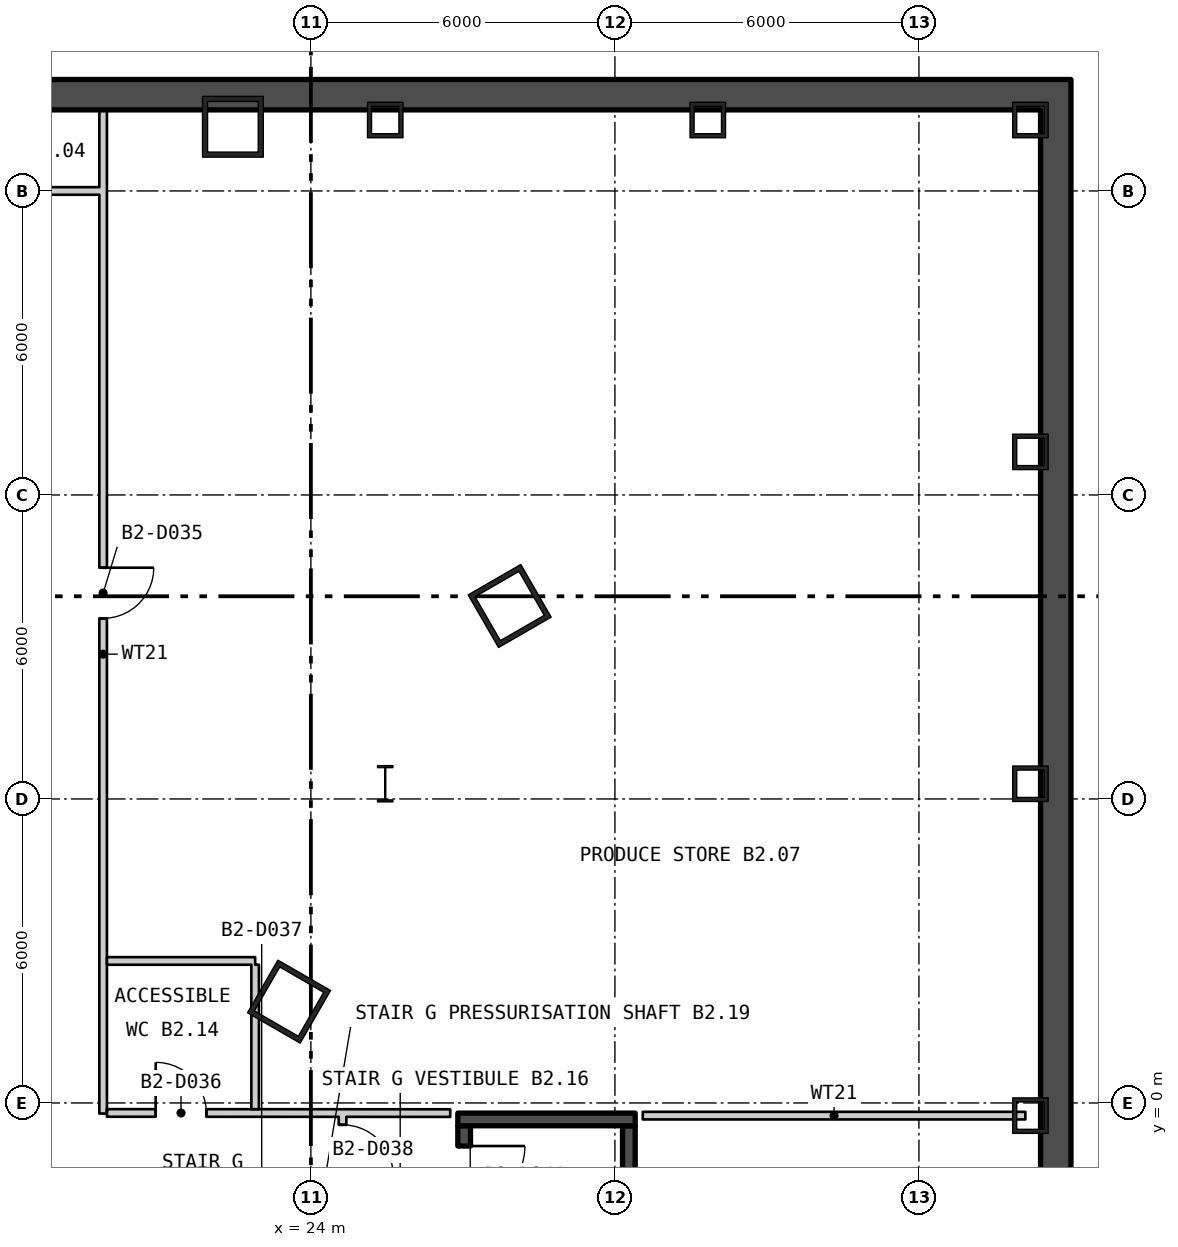
"""IFC4 building model, lengths in metres.
Left out: names, types, materials, properties, quantities, classifications, styles, units other than length and angle.
Written with IfcOpenShell. Run it as: python <this file> out.ifc"""

import sys

from ifc_helpers import new_model, si_unit, direction, frame, frame_2d, origin, origin_2d, place, context, subcontext, project, spatial, rectangle, hollow_rectangle, i_section, extrude, element, fill, save


model = new_model("IFC4")
c1 = context("Model", 3, precision=1e-05, world=origin(), true_north=direction((0.0, 1.0)))
c2 = subcontext(c1, "Body", "Model", "MODEL_VIEW")
j1 = project(units=[si_unit("LENGTHUNIT", "METRE"), si_unit("PLANEANGLEUNIT", "RADIAN")], contexts=[c1])
p1 = place(None, origin())
s1 = spatial("IfcSite", under=j1, at=p1, CompositionType="ELEMENT")
p2 = place(p1, origin())
s2 = spatial("IfcBuilding", under=s1, at=p2, CompositionType="ELEMENT")
p3 = place(p2, frame((0.0, 0.0, -11.4)))
s3 = spatial("IfcBuildingStorey", under=s2, at=p3, CompositionType="ELEMENT", Elevation=-11.4)
for number, where, z_axis, x_axis in (
    (1, (22.461, 19.267, 0.0), (0.0, 0.0, 1.0), (-1.0, 0.0, 0.0)),
    (2, (23.569, 2.0, 0.0), (0.0, 0.0, 1.0), (0.5, 0.866, 0.0)),
    (3, (27.923, 9.808, 0.0), (0.0, 0.0, 1.0), (-0.5, 0.866, 0.0)),
):
    element("IfcColumn", number, at=place(p3, frame(where, z_axis=z_axis, x_axis=x_axis)), inside=s3, PredefinedType="COLUMN", context=c2, shape_type="SweptSolid", body=[
        extrude(hollow_rectangle(XDim=1.2, YDim=1.2, WallThickness=0.1, at=origin_2d()), origin(), (0.0, 0.0, 1.0), 5.7),
    ])
for number, where, z_axis, x_axis in (
    (4, (38.2, -0.25, 0.0), (0.0, 0.0, 1.0), (0.0, 1.0, 0.0)),
    (5, (38.2, 6.3, 0.0), (0.0, 0.0, 1.0), (0.0, 1.0, 0.0)),
    (6, (38.2, 12.85, 0.0), (0.0, 0.0, 1.0), (0.0, 1.0, 0.0)),
    (7, (38.2, 19.4, 0.0), (0.0, 0.0, 1.0), (-1.0, 0.0, 0.0)),
    (8, (31.833, 19.4, 0.0), (0.0, 0.0, 1.0), (-1.0, 0.0, 0.0)),
    (9, (25.467, 19.4, 0.0), (0.0, 0.0, 1.0), (-1.0, 0.0, 0.0)),
):
    element("IfcColumn", number, at=place(p3, frame(where, z_axis=z_axis, x_axis=x_axis)), inside=s3, PredefinedType="COLUMN", context=c2, shape_type="SweptSolid", body=[
        extrude(hollow_rectangle(XDim=0.7, YDim=0.7, WallThickness=0.08, at=origin_2d()), origin(), (0.0, 0.0, 1.0), 5.7),
    ])
p4 = place(p3, frame((25.467, 6.3, 0.0), z_axis=(0.0, 0.0, 1.0), x_axis=(1.0, 0.0, 0.0)))
e10 = element("IfcColumn", 10, at=p4, inside=s3, PredefinedType="COLUMN", context=c2, shape_type="SweptSolid", body=[
    extrude(i_section(OverallWidth=0.304, OverallDepth=0.716, WebThickness=0.021, FlangeThickness=0.04, at=origin_2d()), origin(), (0.0, 0.0, 1.0), 5.7),
])
p5 = place(p3, frame((-39.0, 19.9, -0.4), z_axis=(0.0, 0.0, 1.0), x_axis=(1.0, 0.0, 0.0)))
e11 = element("IfcWall", 11, at=p5, inside=s3, PredefinedType="STANDARD", context=c2, shape_type="SweptSolid", body=[
    extrude(rectangle(XDim=78.0, YDim=0.6, at=frame_2d((39.0, 0.0))), origin(), (0.0, 0.0, 1.0), 5.7),
])
p6 = place(p3, frame((38.7, -33.2, -0.4), z_axis=(0.0, 0.0, 1.0), x_axis=(0.0, 1.0, 0.0)))
e12 = element("IfcWall", 12, at=p6, inside=s3, PredefinedType="STANDARD", context=c2, shape_type="SweptSolid", body=[
    extrude(rectangle(XDim=52.8, YDim=0.6, at=frame_2d((26.4, 0.0))), origin(), (0.0, 0.0, 1.0), 5.7),
])
p7 = place(p3, frame((27.025, -7.75, 0.0), z_axis=(0.0, 0.0, 1.0), x_axis=(0.0, 1.0, 0.0)))
e13 = element("IfcWall", 13, at=p7, inside=s3, PredefinedType="SHEAR", context=c2, shape_type="SweptSolid", body=[
    extrude(rectangle(XDim=7.3, YDim=0.25, at=frame_2d((3.65, 0.0))), origin(), (0.0, 0.0, 1.0), 5.25),
])
p8 = place(p7, frame((5.7, 0.0, 0.0)))
e14 = element("IfcOpeningElement", 14, at=p8, cuts=e13, PredefinedType="OPENING", context=c2, shape_type="SweptSolid", body=[
    extrude(rectangle(XDim=1.2, YDim=2.1, at=frame_2d((0.6, 1.05))), frame((0.0, 0.135, 0.0), z_axis=(0.0, -1.0, 0.0), x_axis=(1.0, 0.0, 0.0)), (0.0, 0.0, 1.0), 0.27),
])
p9 = place(p3, frame((30.275, -7.75, 0.0), z_axis=(0.0, 0.0, 1.0), x_axis=(0.0, 1.0, 0.0)))
e15 = element("IfcWall", 15, at=p9, inside=s3, PredefinedType="SHEAR", context=c2, shape_type="SweptSolid", body=[
    extrude(rectangle(XDim=7.3, YDim=0.25, at=frame_2d((3.65, 0.0))), origin(), (0.0, 0.0, 1.0), 5.25),
])
p10 = place(p3, frame((26.9, -0.325, 0.0), z_axis=(0.0, 0.0, 1.0), x_axis=(1.0, 0.0, 0.0)))
e16 = element("IfcWall", 16, at=p10, inside=s3, PredefinedType="SHEAR", context=c2, shape_type="SweptSolid", body=[
    extrude(rectangle(XDim=3.5, YDim=0.25, at=frame_2d((1.75, 0.0))), origin(), (0.0, 0.0, 1.0), 5.25),
])
p11 = place(p3, frame((17.5, 18.0, 0.0), z_axis=(0.0, 0.0, 1.0), x_axis=(1.0, 0.0, 0.0)))
e17 = element("IfcWall", 17, at=p11, inside=s3, PredefinedType="PARTITIONING", context=c2, shape_type="SweptSolid", body=[
    extrude(rectangle(XDim=2.475, YDim=0.15, at=frame_2d((1.238, 0.0))), origin(), (0.0, 0.0, 1.0), 5.25),
])
p12 = place(p3, frame((19.9, -0.209, 0.0), z_axis=(0.0, 0.0, 1.0), x_axis=(0.0, 1.0, 0.0)))
e18 = element("IfcWall", 18, at=p12, inside=s3, PredefinedType="PARTITIONING", context=c2, shape_type="SweptSolid", body=[
    extrude(rectangle(XDim=18.134, YDim=0.15, at=frame_2d((9.067, 0.0))), origin(), (0.0, 0.0, 1.0), 5.25),
])
p13 = place(p12, frame((9.773, 0.0, 0.0)))
e19 = element("IfcOpeningElement", 19, at=p13, cuts=e18, PredefinedType="OPENING", context=c2, shape_type="SweptSolid", body=[
    extrude(rectangle(XDim=1.0, YDim=2.1, at=frame_2d((0.5, 1.05))), frame((0.0, 0.085, 0.0), z_axis=(0.0, -1.0, 0.0), x_axis=(1.0, 0.0, 0.0)), (0.0, 0.0, 1.0), 0.17),
])
p14 = place(p3, frame((19.9, 18.075, 0.0), z_axis=(0.0, 0.0, 1.0), x_axis=(0.0, 1.0, 0.0)))
e20 = element("IfcWall", 20, at=p14, inside=s3, PredefinedType="PARTITIONING", context=c2, shape_type="SweptSolid", body=[
    extrude(rectangle(XDim=1.675, YDim=0.15, at=frame_2d((0.838, 0.0))), origin(), (0.0, 0.0, 1.0), 5.25),
])
p15 = place(p3, frame((19.975, 2.803, 0.0), z_axis=(0.0, 0.0, 1.0), x_axis=(1.0, 0.0, 0.0)))
e21 = element("IfcWall", 21, at=p15, inside=s3, PredefinedType="PARTITIONING", context=c2, shape_type="SweptSolid", body=[
    extrude(rectangle(XDim=2.925, YDim=0.15, at=frame_2d((1.462, 0.0))), origin(), (0.0, 0.0, 1.0), 5.25),
])
p16 = place(p3, frame((19.975, -0.197, 0.0), z_axis=(0.0, 0.0, 1.0), x_axis=(0.999999901962, -0.000442804385, 0.0)))
e22 = element("IfcWall", 22, at=p16, inside=s3, PredefinedType="PARTITIONING", context=c2, shape_type="SweptSolid", body=[
    extrude(rectangle(XDim=6.775, YDim=0.15, at=frame_2d((3.388, 0.0))), origin(), (0.0, 0.0, 1.0), 5.25),
])
p17 = place(p16, frame((0.962, 0.0, 0.0)))
e23 = element("IfcOpeningElement", 23, at=p17, cuts=e22, PredefinedType="OPENING", context=c2, shape_type="SweptSolid", body=[
    extrude(rectangle(XDim=1.0, YDim=2.1, at=frame_2d((0.5, 1.05))), frame((0.0, 0.085, 0.0), z_axis=(0.0, -1.0, 0.0), x_axis=(1.0, 0.0, 0.0)), (0.0, 0.0, 1.0), 0.17),
])
p18 = place(p3, frame((22.9, -0.123, 0.0), z_axis=(0.0, 0.0, 1.0), x_axis=(0.0, 1.0, 0.0)))
e24 = element("IfcWall", 24, at=p18, inside=s3, PredefinedType="PARTITIONING", context=c2, shape_type="SweptSolid", body=[
    extrude(rectangle(XDim=2.851, YDim=0.15, at=frame_2d((1.425, 0.0))), origin(), (0.0, 0.0, 1.0), 5.25),
])
p19 = place(p3, frame((24.625, -1.588, 0.0), z_axis=(0.0, 0.0, 1.0), x_axis=(0.0, 1.0, 0.0)))
e25 = element("IfcWall", 25, at=p19, inside=s3, PredefinedType="PARTITIONING", context=c2, shape_type="SweptSolid", body=[
    extrude(rectangle(XDim=1.314, YDim=0.15, at=frame_2d((0.657, 0.0))), origin(), (0.0, 0.0, 1.0), 5.25),
])
p20 = place(p19, frame((0.157, 0.0, 0.0)))
e26 = element("IfcOpeningElement", 26, at=p20, cuts=e25, PredefinedType="OPENING", context=c2, shape_type="SweptSolid", body=[
    extrude(rectangle(XDim=1.0, YDim=2.1, at=frame_2d((0.5, 1.05))), frame((0.0, 0.085, 0.0), z_axis=(0.0, -1.0, 0.0), x_axis=(1.0, 0.0, 0.0)), (0.0, 0.0, 1.0), 0.17),
])
p21 = place(p3, frame((30.55, -0.25, 0.0), z_axis=(0.0, 0.0, 1.0), x_axis=(1.0, 0.0, 0.0)))
e27 = element("IfcWall", 27, at=p21, inside=s3, PredefinedType="PARTITIONING", context=c2, shape_type="SweptSolid", body=[
    extrude(rectangle(XDim=7.55, YDim=0.15, at=frame_2d((3.775, 0.0))), origin(), (0.0, 0.0, 1.0), 5.25),
])
p22 = place(p8, origin())
e28 = element("IfcDoor", 28, at=p22, inside=s3, OperationType="SINGLE_SWING_RIGHT", PredefinedType="DOOR", context=c2, shape_type="SweptSolid", body=[
    extrude(rectangle(XDim=1.2, YDim=2.1, at=frame_2d((0.6, 1.05))), frame((0.0, 0.025, 0.0), z_axis=(0.0, -1.0, 0.0), x_axis=(1.0, 0.0, 0.0)), (0.0, 0.0, 1.0), 0.05),
])
fill(e14, e28)
p23 = place(p13, origin())
e29 = element("IfcDoor", 29, at=p23, inside=s3, OperationType="SINGLE_SWING_RIGHT", PredefinedType="DOOR", context=c2, shape_type="SweptSolid", body=[
    extrude(rectangle(XDim=1.0, YDim=2.1, at=frame_2d((0.5, 1.05))), frame((0.0, 0.025, 0.0), z_axis=(0.0, -1.0, 0.0), x_axis=(1.0, 0.0, 0.0)), (0.0, 0.0, 1.0), 0.05),
])
fill(e19, e29)
p24 = place(p17, origin())
e30 = element("IfcDoor", 30, at=p24, inside=s3, OperationType="SINGLE_SWING_RIGHT", PredefinedType="DOOR", context=c2, shape_type="SweptSolid", body=[
    extrude(rectangle(XDim=1.0, YDim=2.1, at=frame_2d((0.5, 1.05))), frame((0.0, 0.025, 0.0), z_axis=(0.0, -1.0, 0.0), x_axis=(1.0, 0.0, 0.0)), (0.0, 0.0, 1.0), 0.05),
])
fill(e23, e30)
p25 = place(p20, origin())
e31 = element("IfcDoor", 31, at=p25, inside=s3, OperationType="SINGLE_SWING_LEFT", PredefinedType="DOOR", context=c2, shape_type="SweptSolid", body=[
    extrude(rectangle(XDim=1.0, YDim=2.1, at=frame_2d((0.5, 1.05))), frame((0.0, 0.025, 0.0), z_axis=(0.0, -1.0, 0.0), x_axis=(1.0, 0.0, 0.0)), (0.0, 0.0, 1.0), 0.05),
])
fill(e26, e31)
save(model, sys.argv[1])
